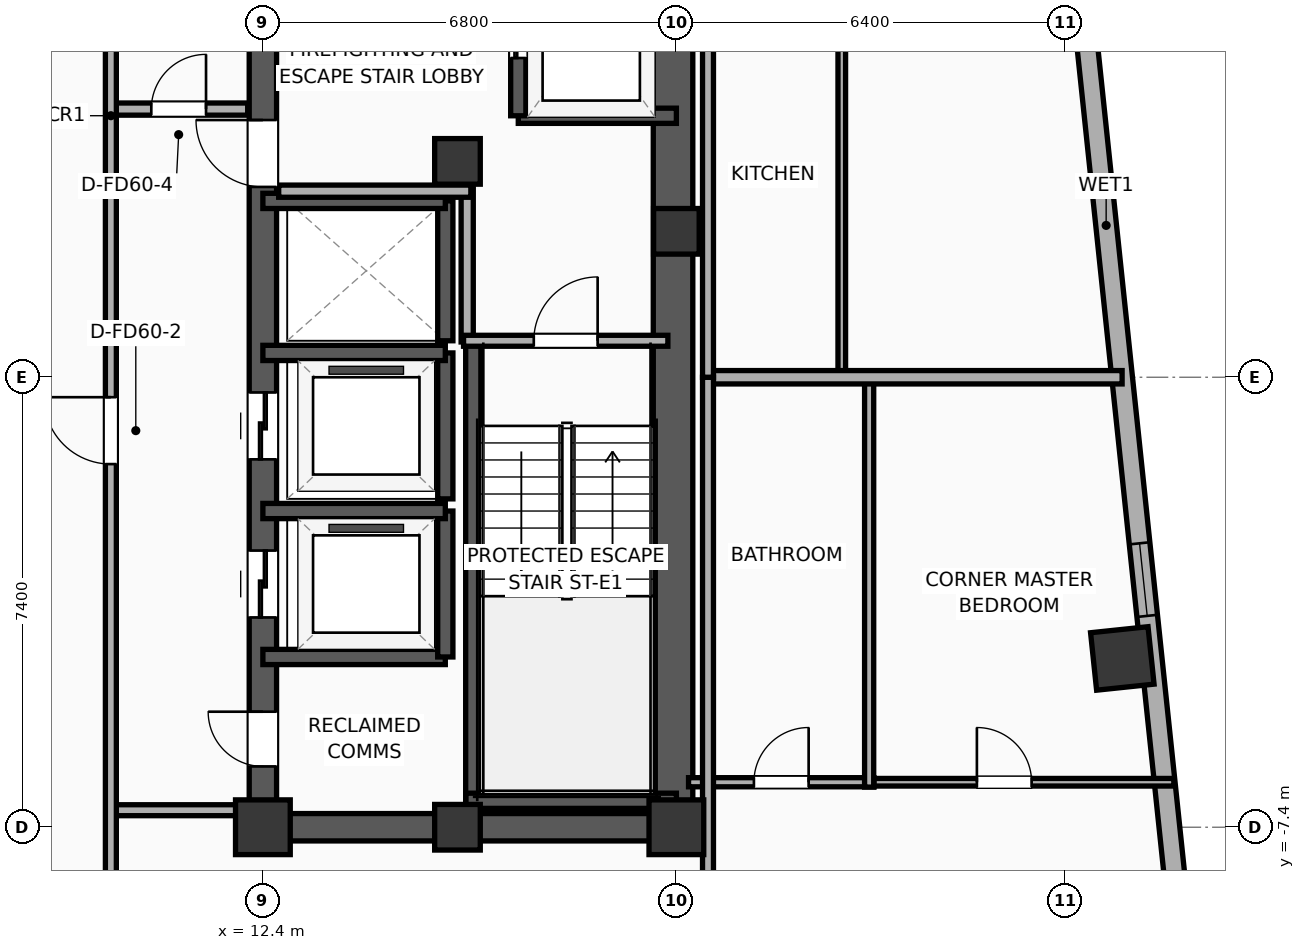
"""IFC4 building model, lengths in metres.
Left out: names, types, materials, properties, quantities, classifications, styles, units other than length and angle.
Written with IfcOpenShell. Run it as: python <this file> out.ifc"""

import sys

from ifc_helpers import new_model, si_unit, direction, frame, frame_2d, origin, origin_2d, place, context, subcontext, project, spatial, rectangle, hollow_rectangle, extrude, element, fill, save


model = new_model("IFC4")
c1 = context("Model", 3, precision=1e-05, world=origin(), true_north=direction((0.0, 1.0)))
c2 = subcontext(c1, "Body", "Model", "MODEL_VIEW")
j1 = project(units=[si_unit("LENGTHUNIT", "METRE"), si_unit("PLANEANGLEUNIT", "RADIAN")], contexts=[c1])
p1 = place(None, origin())
s1 = spatial("IfcSite", under=j1, at=p1, CompositionType="ELEMENT")
p2 = place(p1, origin())
s2 = spatial("IfcBuilding", under=s1, at=p2, CompositionType="ELEMENT")
p3 = place(p2, frame((0.0, 0.0, 187.2)))
s3 = spatial("IfcBuildingStorey", under=s2, at=p3, CompositionType="ELEMENT", Elevation=187.2)
p4 = place(p3, frame((12.4, -7.4, 0.0), z_axis=(0.0, 0.0, 1.0), x_axis=(1.0, 0.0, 0.0)))
e1 = element("IfcColumn", 1, at=p4, inside=s3, PredefinedType="COLUMN", context=c2, shape_type="SweptSolid", body=[
    extrude(rectangle(XDim=0.9, YDim=0.9, at=origin_2d()), origin(), (0.0, 0.0, 1.0), 3.9),
])
for number, where, z_axis, x_axis in (
    (2, (15.6, 3.55, 0.0), (0.0, 0.0, 1.0), (1.0, 0.0, 0.0)),
    (3, (15.6, -7.4, 0.0), (0.0, 0.0, 1.0), (1.0, 0.0, 0.0)),
):
    element("IfcColumn", number, at=place(p3, frame(where, z_axis=z_axis, x_axis=x_axis)), inside=s3, PredefinedType="COLUMN", context=c2, shape_type="SweptSolid", body=[
        extrude(rectangle(XDim=0.75, YDim=0.75, at=origin_2d()), origin(), (0.0, 0.0, 1.0), 3.9),
    ])
p5 = place(p3, frame((19.2, -7.4, 0.0), z_axis=(0.0, 0.0, 1.0), x_axis=(1.0, 0.0, 0.0)))
e4 = element("IfcColumn", 4, at=p5, inside=s3, PredefinedType="COLUMN", context=c2, shape_type="SweptSolid", body=[
    extrude(rectangle(XDim=0.9, YDim=0.9, at=origin_2d()), origin(), (0.0, 0.0, 1.0), 3.9),
])
p6 = place(p3, frame((19.2, 2.4, 0.0), z_axis=(0.0, 0.0, 1.0), x_axis=(1.0, 0.0, 0.0)))
e5 = element("IfcColumn", 5, at=p6, inside=s3, PredefinedType="COLUMN", context=c2, shape_type="SweptSolid", body=[
    extrude(rectangle(XDim=0.75, YDim=0.75, at=origin_2d()), origin(), (0.0, 0.0, 1.0), 3.9),
])
p7 = place(p3, frame((12.175, -7.4, 0.0), z_axis=(0.0, 0.0, 1.0), x_axis=(1.0, 0.0, 0.0)))
e6 = element("IfcWall", 6, at=p7, inside=s3, PredefinedType="SHEAR", context=c2, shape_type="SweptSolid", body=[
    extrude(rectangle(XDim=7.25, YDim=0.45, at=frame_2d((3.625, 0.0))), origin(), (0.0, 0.0, 1.0), 3.65),
])
p8 = place(p3, frame((12.4, -7.4, 0.0), z_axis=(0.0, 0.0, 1.0), x_axis=(0.0, 1.0, 0.0)))
e7 = element("IfcWall", 7, at=p8, inside=s3, PredefinedType="SHEAR", context=c2, shape_type="SweptSolid", body=[
    extrude(rectangle(XDim=14.8, YDim=0.45, at=frame_2d((7.4, 0.0))), origin(), (0.0, 0.0, 1.0), 3.65),
])
p9 = place(p8, frame((3.45, 0.0, 0.0)))
e8 = element("IfcOpeningElement", 8, at=p9, cuts=e7, PredefinedType="OPENING", context=c2, shape_type="SweptSolid", body=[
    extrude(rectangle(XDim=1.1, YDim=2.05, at=frame_2d((0.55, 1.025))), frame((0.0, 0.235, 0.0), z_axis=(0.0, -1.0, 0.0), x_axis=(1.0, 0.0, 0.0)), (0.0, 0.0, 1.0), 0.47),
])
p10 = place(p8, frame((6.05, 0.0, 0.0)))
e9 = element("IfcOpeningElement", 9, at=p10, cuts=e7, PredefinedType="OPENING", context=c2, shape_type="SweptSolid", body=[
    extrude(rectangle(XDim=1.1, YDim=2.05, at=frame_2d((0.55, 1.025))), frame((0.0, 0.235, 0.0), z_axis=(0.0, -1.0, 0.0), x_axis=(1.0, 0.0, 0.0)), (0.0, 0.0, 1.0), 0.47),
])
p11 = place(p8, frame((10.53, 0.0, 0.0)))
e10 = element("IfcOpeningElement", 10, at=p11, cuts=e7, PredefinedType="OPENING", context=c2, shape_type="SweptSolid", body=[
    extrude(rectangle(XDim=1.1, YDim=2.05, at=frame_2d((0.55, 1.025))), frame((0.0, 0.235, 0.0), z_axis=(0.0, -1.0, 0.0), x_axis=(1.0, 0.0, 0.0)), (0.0, 0.0, 1.0), 0.47),
])
p12 = place(p8, frame((1.0, 0.0, 0.0)))
e11 = element("IfcOpeningElement", 11, at=p12, cuts=e7, PredefinedType="OPENING", context=c2, shape_type="SweptSolid", body=[
    extrude(rectangle(XDim=0.9, YDim=2.05, at=frame_2d((0.45, 1.025))), frame((0.0, 0.235, 0.0), z_axis=(0.0, -1.0, 0.0), x_axis=(1.0, 0.0, 0.0)), (0.0, 0.0, 1.0), 0.47),
])
p13 = place(p3, frame((19.145, -7.4, 0.0), z_axis=(0.0, 0.0, 1.0), x_axis=(0.0, 1.0, 0.0)))
e12 = element("IfcWall", 12, at=p13, inside=s3, PredefinedType="SHEAR", context=c2, shape_type="SweptSolid", body=[
    extrude(rectangle(XDim=14.8, YDim=0.65, at=frame_2d((7.4, 0.0))), origin(), (0.0, 0.0, 1.0), 3.65),
])
p14 = place(p3, frame((15.86, -7.085, 0.0), z_axis=(0.0, 0.0, 1.0), x_axis=(0.0, 1.0, 0.0)))
e13 = element("IfcWall", 13, at=p14, inside=s3, PredefinedType="SOLIDWALL", context=c2, shape_type="SweptSolid", body=[
    extrude(rectangle(XDim=7.685, YDim=0.25, at=frame_2d((3.843, 0.0))), origin(), (0.0, 0.0, 1.0), 3.65),
])
p15 = place(p3, frame((15.74, -6.965, 0.0), z_axis=(0.0, 0.0, 1.0), x_axis=(1.0, 0.0, 0.0)))
e14 = element("IfcWall", 14, at=p15, inside=s3, PredefinedType="SOLIDWALL", context=c2, shape_type="SweptSolid", body=[
    extrude(rectangle(XDim=3.46, YDim=0.25, at=frame_2d((1.73, 0.0))), origin(), (0.0, 0.0, 1.0), 3.65),
])
p16 = place(p3, frame((26.533, -4.624, 0.0), z_axis=(0.0, 0.0, 1.0), x_axis=(0.994521895368, 0.104528463268, 0.0)))
e15 = element("IfcColumn", 15, at=p16, inside=s3, PredefinedType="COLUMN", context=c2, shape_type="SweptSolid", body=[
    extrude(hollow_rectangle(XDim=0.95, YDim=0.95, WallThickness=0.032, at=origin_2d()), origin(), (0.0, 0.0, 1.0), 3.9),
])
p17 = place(p3, frame((24.534, 18.99, 0.0), z_axis=(0.0, 0.0, 1.0), x_axis=(0.104534959766, -0.994521212537, 0.0)))
e16 = element("IfcWall", 16, at=p17, inside=s3, PredefinedType="ELEMENTEDWALL", context=c2, shape_type="SweptSolid", body=[
    extrude(rectangle(XDim=33.166, YDim=0.34, at=frame_2d((16.583, 0.0))), origin(), (0.0, 0.0, 1.0), 3.65),
])
p18 = place(p17, frame((6.542, 0.0, 0.75)))
e17 = element("IfcOpeningElement", 17, at=p18, cuts=e16, PredefinedType="OPENING", context=c2, shape_type="SweptSolid", body=[
    extrude(rectangle(XDim=1.8, YDim=2.1, at=frame_2d((0.9, 1.05))), frame((0.0, 0.18, 0.0), z_axis=(0.0, -1.0, 0.0), x_axis=(1.0, 0.0, 0.0)), (0.0, 0.0, 1.0), 0.36),
])
p19 = place(p17, frame((21.84, 0.0, 0.75)))
e18 = element("IfcOpeningElement", 18, at=p19, cuts=e16, PredefinedType="OPENING", context=c2, shape_type="SweptSolid", body=[
    extrude(rectangle(XDim=1.2, YDim=2.05, at=frame_2d((0.6, 1.025))), frame((0.0, 0.18, 0.0), z_axis=(0.0, -1.0, 0.0), x_axis=(1.0, 0.0, 0.0)), (0.0, 0.0, 1.0), 0.36),
])
p20 = place(p3, frame((16.6, 4.3, 0.0), z_axis=(0.0, 0.0, 1.0), x_axis=(1.0, 0.0, 0.0)))
e19 = element("IfcWall", 19, at=p20, inside=s3, PredefinedType="SOLIDWALL", context=c2, shape_type="SweptSolid", body=[
    extrude(rectangle(XDim=2.6, YDim=0.25, at=frame_2d((1.3, 0.0))), origin(), (0.0, 0.0, 1.0), 3.65),
])
p21 = place(p3, frame((16.6, 7.4, 0.0), z_axis=(0.0, 0.0, 1.0), x_axis=(0.0, -1.0, 0.0)))
e20 = element("IfcWall", 20, at=p21, inside=s3, PredefinedType="SOLIDWALL", context=c2, shape_type="SweptSolid", body=[
    extrude(rectangle(XDim=3.1, YDim=0.25, at=frame_2d((1.55, 0.0))), origin(), (0.0, 0.0, 1.0), 3.65),
])
p22 = place(p21, frame((0.95, 0.0, 0.0)))
e21 = element("IfcOpeningElement", 21, at=p22, cuts=e20, PredefinedType="OPENING", context=c2, shape_type="SweptSolid", body=[
    extrude(rectangle(XDim=1.2, YDim=2.05, at=frame_2d((0.6, 1.025))), frame((0.0, 0.135, 0.0), z_axis=(0.0, -1.0, 0.0), x_axis=(1.0, 0.0, 0.0)), (0.0, 0.0, 1.0), 0.27),
])
p23 = place(p3, frame((12.4, -4.6, 0.0), z_axis=(0.0, 0.0, 1.0), x_axis=(1.0, 0.0, 0.0)))
e22 = element("IfcWall", 22, at=p23, inside=s3, PredefinedType="SOLIDWALL", context=c2, shape_type="SweptSolid", body=[
    extrude(rectangle(XDim=3.0, YDim=0.25, at=frame_2d((1.5, 0.0))), origin(), (0.0, 0.0, 1.0), 3.65),
])
p24 = place(p3, frame((15.4, -4.6, 0.0), z_axis=(0.0, 0.0, 1.0), x_axis=(0.0, 1.0, 0.0)))
e23 = element("IfcWall", 23, at=p24, inside=s3, PredefinedType="SOLIDWALL", context=c2, shape_type="SweptSolid", body=[
    extrude(rectangle(XDim=2.4, YDim=0.25, at=frame_2d((1.2, 0.0))), origin(), (0.0, 0.0, 1.0), 3.65),
])
p25 = place(p3, frame((15.4, -2.2, 0.0), z_axis=(0.0, 0.0, 1.0), x_axis=(-1.0, 0.0, 0.0)))
e24 = element("IfcWall", 24, at=p25, inside=s3, PredefinedType="SOLIDWALL", context=c2, shape_type="SweptSolid", body=[
    extrude(rectangle(XDim=3.0, YDim=0.25, at=frame_2d((1.5, 0.0))), origin(), (0.0, 0.0, 1.0), 3.65),
])
p26 = place(p3, frame((15.4, -2.0, 0.0), z_axis=(0.0, 0.0, 1.0), x_axis=(0.0, 1.0, 0.0)))
e25 = element("IfcWall", 25, at=p26, inside=s3, PredefinedType="SOLIDWALL", context=c2, shape_type="SweptSolid", body=[
    extrude(rectangle(XDim=2.4, YDim=0.25, at=frame_2d((1.2, 0.0))), origin(), (0.0, 0.0, 1.0), 3.65),
])
p27 = place(p3, frame((15.4, 0.4, 0.0), z_axis=(0.0, 0.0, 1.0), x_axis=(-1.0, 0.0, 0.0)))
e26 = element("IfcWall", 26, at=p27, inside=s3, PredefinedType="SOLIDWALL", context=c2, shape_type="SweptSolid", body=[
    extrude(rectangle(XDim=3.0, YDim=0.25, at=frame_2d((1.5, 0.0))), origin(), (0.0, 0.0, 1.0), 3.65),
])
p28 = place(p3, frame((15.4, 0.6, 0.0), z_axis=(0.0, 0.0, 1.0), x_axis=(0.0, 1.0, 0.0)))
e27 = element("IfcWall", 27, at=p28, inside=s3, PredefinedType="SOLIDWALL", context=c2, shape_type="SweptSolid", body=[
    extrude(rectangle(XDim=2.3, YDim=0.25, at=frame_2d((1.15, 0.0))), origin(), (0.0, 0.0, 1.0), 3.65),
])
p29 = place(p3, frame((15.4, 2.9, 0.0), z_axis=(0.0, 0.0, 1.0), x_axis=(-1.0, 0.0, 0.0)))
e28 = element("IfcWall", 28, at=p29, inside=s3, PredefinedType="SOLIDWALL", context=c2, shape_type="SweptSolid", body=[
    extrude(rectangle(XDim=3.0, YDim=0.25, at=frame_2d((1.5, 0.0))), origin(), (0.0, 0.0, 1.0), 3.65),
])
p30 = place(p3, frame((15.76, 0.58, 0.0), z_axis=(0.0, 0.0, 1.0), x_axis=(0.0, 1.0, 0.0)))
e29 = element("IfcWall", 29, at=p30, inside=s3, PredefinedType="PARTITIONING", context=c2, shape_type="SweptSolid", body=[
    extrude(rectangle(XDim=2.52, YDim=0.2, at=frame_2d((1.26, 0.0))), origin(), (0.0, 0.0, 1.0), 3.65),
])
p31 = place(p3, frame((12.66, 3.06, 0.0), z_axis=(0.0, 0.0, 1.0), x_axis=(1.0, 0.0, 0.0)))
e30 = element("IfcWall", 30, at=p31, inside=s3, PredefinedType="PARTITIONING", context=c2, shape_type="SweptSolid", body=[
    extrude(rectangle(XDim=3.16, YDim=0.2, at=frame_2d((1.58, 0.0))), origin(), (0.0, 0.0, 1.0), 3.65),
])
p32 = place(p3, frame((15.7, 0.6, 0.0), z_axis=(0.0, 0.0, 1.0), x_axis=(1.0, 0.0, 0.0)))
e31 = element("IfcWall", 31, at=p32, inside=s3, PredefinedType="PARTITIONING", context=c2, shape_type="SweptSolid", body=[
    extrude(rectangle(XDim=3.36, YDim=0.18, at=frame_2d((1.68, 0.0))), origin(), (0.0, 0.0, 1.0), 3.65),
])
p33 = place(p32, frame((1.155, 0.0, 0.0)))
e32 = element("IfcOpeningElement", 32, at=p33, cuts=e31, PredefinedType="OPENING", context=c2, shape_type="SweptSolid", body=[
    extrude(rectangle(XDim=1.05, YDim=2.05, at=frame_2d((0.525, 1.025))), frame((0.0, 0.1, 0.0), z_axis=(0.0, -1.0, 0.0), x_axis=(1.0, 0.0, 0.0)), (0.0, 0.0, 1.0), 0.2),
])
p34 = place(p3, frame((9.88, 4.41, 0.0), z_axis=(0.0, 0.0, 1.0), x_axis=(1.0, 0.0, 0.0)))
e33 = element("IfcWall", 33, at=p34, inside=s3, PredefinedType="PARTITIONING", context=c2, shape_type="SweptSolid", body=[
    extrude(rectangle(XDim=2.27, YDim=0.2, at=frame_2d((1.135, 0.0))), origin(), (0.0, 0.0, 1.0), 3.65),
])
p35 = place(p34, frame((0.685, 0.0, 0.0)))
e34 = element("IfcOpeningElement", 34, at=p35, cuts=e33, PredefinedType="OPENING", context=c2, shape_type="SweptSolid", body=[
    extrude(rectangle(XDim=0.9, YDim=2.05, at=frame_2d((0.45, 1.025))), frame((0.0, 0.11, 0.0), z_axis=(0.0, -1.0, 0.0), x_axis=(1.0, 0.0, 0.0)), (0.0, 0.0, 1.0), 0.22),
])
p36 = place(p3, frame((9.88, -7.12, 0.0), z_axis=(0.0, 0.0, 1.0), x_axis=(1.0, 0.0, 0.0)))
e35 = element("IfcWall", 35, at=p36, inside=s3, PredefinedType="PARTITIONING", context=c2, shape_type="SweptSolid", body=[
    extrude(rectangle(XDim=2.27, YDim=0.18, at=frame_2d((1.135, 0.0))), origin(), (0.0, 0.0, 1.0), 3.65),
])
p37 = place(p3, frame((9.9, -8.78, 0.0), z_axis=(0.0, 0.0, 1.0), x_axis=(0.0, 1.0, 0.0)))
e36 = element("IfcWall", 36, at=p37, inside=s3, PredefinedType="PARTITIONING", context=c2, shape_type="SweptSolid", body=[
    extrude(rectangle(XDim=17.56, YDim=0.18, at=frame_2d((8.78, 0.0))), origin(), (0.0, 0.0, 1.0), 3.65),
])
p38 = place(p37, frame((7.352, 0.0, 0.0)))
e37 = element("IfcOpeningElement", 37, at=p38, cuts=e36, PredefinedType="OPENING", context=c2, shape_type="SweptSolid", body=[
    extrude(rectangle(XDim=1.1, YDim=2.05, at=frame_2d((0.55, 1.025))), frame((0.0, 0.1, 0.0), z_axis=(0.0, -1.0, 0.0), x_axis=(1.0, 0.0, 0.0)), (0.0, 0.0, 1.0), 0.2),
])
p39 = place(p3, frame((22.31, -6.66, 0.0), z_axis=(0.0, 0.0, 1.0), x_axis=(1.0, 0.0, 0.0)))
e38 = element("IfcWall", 38, at=p39, inside=s3, PredefinedType="PARTITIONING", context=c2, shape_type="SweptSolid", body=[
    extrude(rectangle(XDim=5.071, YDim=0.125, at=frame_2d((2.536, 0.0))), origin(), (0.0, 0.0, 1.0), 3.65),
])
p40 = place(p39, frame((1.832, 0.0, 0.0)))
e39 = element("IfcOpeningElement", 39, at=p40, cuts=e38, PredefinedType="OPENING", context=c2, shape_type="SweptSolid", body=[
    extrude(rectangle(XDim=0.9, YDim=2.05, at=frame_2d((0.45, 1.025))), frame((0.0, 0.073, 0.0), z_axis=(0.0, -1.0, 0.0), x_axis=(1.0, 0.0, 0.0)), (0.0, 0.0, 1.0), 0.145),
])
p41 = place(p3, frame((19.4, -6.66, 0.0), z_axis=(0.0, 0.0, 1.0), x_axis=(1.0, 0.0, 0.0)))
e40 = element("IfcWall", 40, at=p41, inside=s3, PredefinedType="PLUMBINGWALL", context=c2, shape_type="SweptSolid", body=[
    extrude(rectangle(XDim=3.05, YDim=0.15, at=frame_2d((1.525, 0.0))), origin(), (0.0, 0.0, 1.0), 3.04),
])
p42 = place(p41, frame((1.075, 0.0, 0.0)))
e41 = element("IfcOpeningElement", 41, at=p42, cuts=e40, PredefinedType="OPENING", context=c2, shape_type="SweptSolid", body=[
    extrude(rectangle(XDim=0.9, YDim=2.05, at=frame_2d((0.45, 1.025))), frame((0.0, 0.085, 0.0), z_axis=(0.0, -1.0, 0.0), x_axis=(1.0, 0.0, 0.0)), (0.0, 0.0, 1.0), 0.17),
])
p43 = place(p3, frame((22.37, -6.74, 0.0), z_axis=(0.0, 0.0, 1.0), x_axis=(0.0, 1.0, 0.0)))
e42 = element("IfcWall", 42, at=p43, inside=s3, PredefinedType="PLUMBINGWALL", context=c2, shape_type="SweptSolid", body=[
    extrude(rectangle(XDim=6.72, YDim=0.15, at=frame_2d((3.36, 0.0))), origin(), (0.0, 0.0, 1.0), 3.65),
])
p44 = place(p3, frame((21.92, 0.02, 0.0), z_axis=(0.0, 0.0, 1.0), x_axis=(0.0, 1.0, 0.0)))
e43 = element("IfcWall", 43, at=p44, inside=s3, PredefinedType="PARTITIONING", context=c2, shape_type="SweptSolid", body=[
    extrude(rectangle(XDim=6.72, YDim=0.125, at=frame_2d((3.36, 0.0))), origin(), (0.0, 0.0, 1.0), 3.65),
])
p45 = place(p3, frame((19.72, 0.0, 0.0), z_axis=(0.0, 0.0, 1.0), x_axis=(1.0, 0.0, 0.0)))
e44 = element("IfcWall", 44, at=p45, inside=s3, PredefinedType="PARTITIONING", context=c2, shape_type="SweptSolid", body=[
    extrude(rectangle(XDim=6.81, YDim=0.22, at=frame_2d((3.405, 0.0))), origin(), (0.0, 0.0, 1.0), 3.65),
])
p46 = place(p3, frame((19.72, -18.532, 0.0), z_axis=(0.0, 0.0, 1.0), x_axis=(0.0, 1.0, 0.0)))
e45 = element("IfcWall", 45, at=p46, inside=s3, PredefinedType="PARTITIONING", context=c2, shape_type="SweptSolid", body=[
    extrude(rectangle(XDim=18.532, YDim=0.18, at=frame_2d((9.266, 0.0))), origin(), (0.0, 0.0, 1.0), 3.65),
])
p47 = place(p46, frame((8.653, 0.0, 0.0)))
e46 = element("IfcOpeningElement", 46, at=p47, cuts=e45, PredefinedType="OPENING", context=c2, shape_type="SweptSolid", body=[
    extrude(rectangle(XDim=0.9, YDim=2.05, at=frame_2d((0.45, 1.025))), frame((0.0, 0.1, 0.0), z_axis=(0.0, -1.0, 0.0), x_axis=(1.0, 0.0, 0.0)), (0.0, 0.0, 1.0), 0.2),
])
p48 = place(p3, frame((19.72, 0.0, 0.0), z_axis=(0.0, 0.0, 1.0), x_axis=(0.0, 1.0, 0.0)))
e47 = element("IfcWall", 47, at=p48, inside=s3, PredefinedType="PARTITIONING", context=c2, shape_type="SweptSolid", body=[
    extrude(rectangle(XDim=22.15, YDim=0.18, at=frame_2d((11.075, 0.0))), origin(), (0.0, 0.0, 1.0), 3.04),
])
p49 = place(p48, frame((8.979, 0.0, 0.0)))
e48 = element("IfcOpeningElement", 48, at=p49, cuts=e47, PredefinedType="OPENING", context=c2, shape_type="SweptSolid", body=[
    extrude(rectangle(XDim=0.9, YDim=2.05, at=frame_2d((0.45, 1.025))), frame((0.0, 0.1, 0.0), z_axis=(0.0, -1.0, 0.0), x_axis=(1.0, 0.0, 0.0)), (0.0, 0.0, 1.0), 0.2),
])
p50 = place(p19, origin())
e49 = element("IfcWindow", 49, at=p50, inside=s3, PartitioningType="SINGLE_PANEL", PredefinedType="WINDOW", context=c2, shape_type="SweptSolid", body=[
    extrude(rectangle(XDim=1.2, YDim=2.05, at=frame_2d((0.6, 1.025))), frame((0.0, 0.03, 0.0), z_axis=(0.0, -1.0, 0.0), x_axis=(1.0, 0.0, 0.0)), (0.0, 0.0, 1.0), 0.06),
])
fill(e18, e49)
p51 = place(p22, origin())
e50 = element("IfcDoor", 50, at=p51, inside=s3, OperationType="SLIDING_TO_LEFT", PredefinedType="DOOR", context=c2, shape_type="SweptSolid", body=[
    extrude(rectangle(XDim=1.2, YDim=2.05, at=frame_2d((0.6, 1.025))), frame((0.0, 0.025, 0.0), z_axis=(0.0, -1.0, 0.0), x_axis=(1.0, 0.0, 0.0)), (0.0, 0.0, 1.0), 0.05),
])
fill(e21, e50)
p52 = place(p9, origin())
e51 = element("IfcDoor", 51, at=p52, inside=s3, OperationType="SLIDING_TO_LEFT", PredefinedType="DOOR", context=c2, shape_type="SweptSolid", body=[
    extrude(rectangle(XDim=1.1, YDim=2.05, at=frame_2d((0.55, 1.025))), frame((0.0, 0.025, 0.0), z_axis=(0.0, -1.0, 0.0), x_axis=(1.0, 0.0, 0.0)), (0.0, 0.0, 1.0), 0.05),
])
fill(e8, e51)
p53 = place(p10, origin())
e52 = element("IfcDoor", 52, at=p53, inside=s3, OperationType="SLIDING_TO_LEFT", PredefinedType="DOOR", context=c2, shape_type="SweptSolid", body=[
    extrude(rectangle(XDim=1.1, YDim=2.05, at=frame_2d((0.55, 1.025))), frame((0.0, 0.025, 0.0), z_axis=(0.0, -1.0, 0.0), x_axis=(1.0, 0.0, 0.0)), (0.0, 0.0, 1.0), 0.05),
])
fill(e9, e52)
p54 = place(p33, origin())
e53 = element("IfcDoor", 53, at=p54, inside=s3, OperationType="SINGLE_SWING_RIGHT", PredefinedType="DOOR", context=c2, shape_type="SweptSolid", body=[
    extrude(rectangle(XDim=1.05, YDim=2.05, at=frame_2d((0.525, 1.025))), frame((0.0, 0.025, 0.0), z_axis=(0.0, -1.0, 0.0), x_axis=(1.0, 0.0, 0.0)), (0.0, 0.0, 1.0), 0.05),
])
fill(e32, e53)
p55 = place(p35, origin())
e54 = element("IfcDoor", 54, at=p55, inside=s3, OperationType="SINGLE_SWING_RIGHT", PredefinedType="DOOR", context=c2, shape_type="SweptSolid", body=[
    extrude(rectangle(XDim=0.9, YDim=2.05, at=frame_2d((0.45, 1.025))), frame((0.0, 0.025, 0.0), z_axis=(0.0, -1.0, 0.0), x_axis=(1.0, 0.0, 0.0)), (0.0, 0.0, 1.0), 0.05),
])
fill(e34, e54)
p56 = place(p38, origin())
e55 = element("IfcDoor", 55, at=p56, inside=s3, OperationType="SINGLE_SWING_RIGHT", PredefinedType="DOOR", context=c2, shape_type="SweptSolid", body=[
    extrude(rectangle(XDim=1.1, YDim=2.05, at=frame_2d((0.55, 1.025))), frame((0.0, 0.025, 0.0), z_axis=(0.0, -1.0, 0.0), x_axis=(1.0, 0.0, 0.0)), (0.0, 0.0, 1.0), 0.05),
])
fill(e37, e55)
p57 = place(p40, origin())
e56 = element("IfcDoor", 56, at=p57, inside=s3, OperationType="SINGLE_SWING_LEFT", PredefinedType="DOOR", context=c2, shape_type="SweptSolid", body=[
    extrude(rectangle(XDim=0.9, YDim=2.05, at=frame_2d((0.45, 1.025))), frame((0.0, 0.025, 0.0), z_axis=(0.0, -1.0, 0.0), x_axis=(1.0, 0.0, 0.0)), (0.0, 0.0, 1.0), 0.05),
])
fill(e39, e56)
p58 = place(p42, origin())
e57 = element("IfcDoor", 57, at=p58, inside=s3, OperationType="SINGLE_SWING_RIGHT", PredefinedType="DOOR", context=c2, shape_type="SweptSolid", body=[
    extrude(rectangle(XDim=0.9, YDim=2.05, at=frame_2d((0.45, 1.025))), frame((0.0, 0.025, 0.0), z_axis=(0.0, -1.0, 0.0), x_axis=(1.0, 0.0, 0.0)), (0.0, 0.0, 1.0), 0.05),
])
fill(e41, e57)
p59 = place(p11, origin())
e58 = element("IfcDoor", 58, at=p59, inside=s3, OperationType="SINGLE_SWING_RIGHT", PredefinedType="DOOR", context=c2, shape_type="SweptSolid", body=[
    extrude(rectangle(XDim=1.1, YDim=2.05, at=frame_2d((0.55, 1.025))), frame((0.0, 0.025, 0.0), z_axis=(0.0, -1.0, 0.0), x_axis=(1.0, 0.0, 0.0)), (0.0, 0.0, 1.0), 0.05),
])
fill(e10, e58)
p60 = place(p12, origin())
e59 = element("IfcDoor", 59, at=p60, inside=s3, OperationType="SINGLE_SWING_RIGHT", PredefinedType="DOOR", context=c2, shape_type="SweptSolid", body=[
    extrude(rectangle(XDim=0.9, YDim=2.05, at=frame_2d((0.45, 1.025))), frame((0.0, 0.025, 0.0), z_axis=(0.0, -1.0, 0.0), x_axis=(1.0, 0.0, 0.0)), (0.0, 0.0, 1.0), 0.05),
])
fill(e11, e59)
save(model, sys.argv[1])
